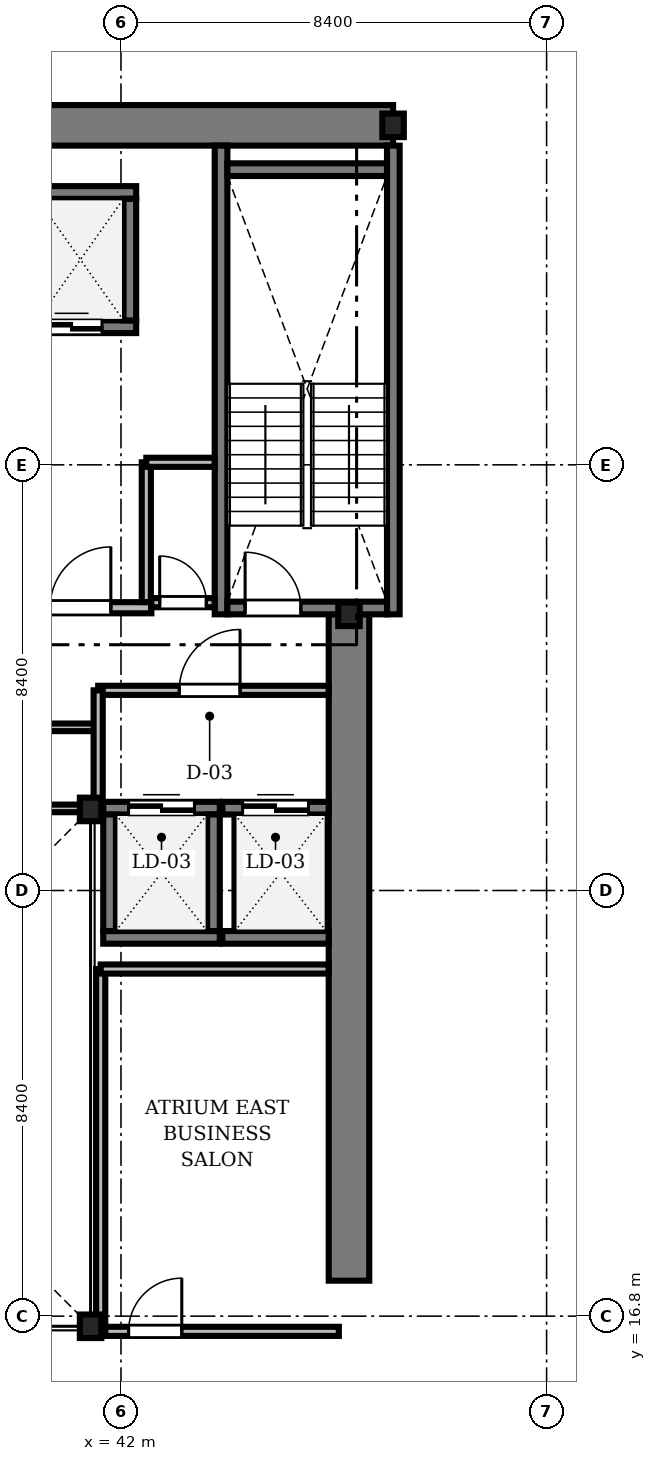
"""IFC4 building model, lengths in metres.
Left out: names, types, materials, properties, quantities, classifications, styles, units other than length and angle.
Written with IfcOpenShell. Run it as: python <this file> out.ifc"""

import sys

from ifc_helpers import new_model, si_unit, direction, frame, frame_2d, origin, origin_2d, place, context, subcontext, project, spatial, rectangle, i_section, extrude, source, transform, mapped, element, fill, save


model = new_model("IFC4")
c1 = context("Model", 3, precision=1e-05, world=origin(), true_north=direction((0.0, 1.0)))
c2 = subcontext(c1, "Body", "Model", "MODEL_VIEW")
j1 = project(units=[si_unit("LENGTHUNIT", "METRE"), si_unit("PLANEANGLEUNIT", "RADIAN")], contexts=[c1])
p1 = place(None, origin())
s1 = spatial("IfcSite", under=j1, at=p1, CompositionType="ELEMENT")
p2 = place(p1, origin())
s2 = spatial("IfcBuilding", under=s1, at=p2, CompositionType="ELEMENT")
p3 = place(p2, frame((0.0, 0.0, 129.8)))
s3 = spatial("IfcBuildingStorey", under=s2, at=p3, CompositionType="ELEMENT", Elevation=129.8)
m1 = source(origin(), c2, "Body", "SweptSolid", [
    extrude(rectangle(XDim=17.52, YDim=0.8, at=frame_2d((8.76, 0.0))), origin(), (0.0, 0.0, 1.0), 3.46),
])
p4 = place(p3, frame((29.85, 40.3, 0.0), z_axis=(0.0, 0.0, 1.0), x_axis=(1.0, 0.0, 0.0)))
e1 = element("IfcWall", 1, at=p4, inside=s3, PredefinedType="SHEAR", context=c2, shape_type="MappedRepresentation", body=[
    mapped(m1, transform((0.0, 0.0, 0.0), scale=1.0)),
])
m2 = source(origin(), c2, "Body", "SweptSolid", [
    extrude(rectangle(XDim=13.15, YDim=0.8, at=frame_2d((6.575, 0.0))), origin(), (0.0, 0.0, 1.0), 3.46),
])
p5 = place(p3, frame((46.5, 17.5, 0.0), z_axis=(0.0, 0.0, 1.0), x_axis=(0.0, 1.0, 0.0)))
e2 = element("IfcWall", 2, at=p5, inside=s3, PredefinedType="SHEAR", context=c2, shape_type="MappedRepresentation", body=[
    mapped(m2, transform((0.0, 0.0, 0.0), scale=1.0)),
])
m3 = source(origin(), c2, "Body", "SweptSolid", [
    extrude(i_section(OverallWidth=0.424, OverallDepth=0.465, WebThickness=0.035, FlangeThickness=0.056, FilletRadius=0.015, at=origin_2d()), origin(), (0.0, 0.0, 1.0), 3.46),
])
for number, where, z_axis, x_axis in (
    (3, (41.4, 16.6, 0.0), (0.0, 0.0, 1.0), (1.0, 0.0, 0.0)),
    (4, (41.4, 26.8, 0.0), (0.0, 0.0, 1.0), (1.0, 0.0, 0.0)),
    (5, (46.5, 30.65, 0.0), (0.0, 0.0, 1.0), (1.0, 0.0, 0.0)),
    (6, (47.37, 40.3, 0.0), (0.0, 0.0, 1.0), (1.0, 0.0, 0.0)),
):
    element("IfcColumn", number, at=place(p3, frame(where, z_axis=z_axis, x_axis=x_axis)), inside=s3, PredefinedType="COLUMN", context=c2, shape_type="MappedRepresentation", body=[
        mapped(m3, transform((0.0, 0.0, 0.0), scale=1.0)),
    ])
m4 = source(origin(), c2, "Body", "SweptSolid", [
    extrude(rectangle(XDim=9.25, YDim=0.25, at=frame_2d((4.625, 0.0))), origin(), (0.0, 0.0, 1.0), 3.5),
])
for number, where, z_axis, x_axis in (
    (7, (43.975, 30.65, 0.0), (0.0, 0.0, 1.0), (0.0, 1.0, 0.0)),
    (8, (47.375, 30.65, 0.0), (0.0, 0.0, 1.0), (0.0, 1.0, 0.0)),
):
    element("IfcWall", number, at=place(p3, frame(where, z_axis=z_axis, x_axis=x_axis)), inside=s3, PredefinedType="SOLIDWALL", context=c2, shape_type="MappedRepresentation", body=[
        mapped(m4, transform((0.0, 0.0, 0.0), scale=1.0)),
    ])
m5 = source(origin(), c2, "Body", "SweptSolid", [
    extrude(rectangle(XDim=3.15, YDim=0.25, at=frame_2d((1.575, 0.0))), origin(), (0.0, 0.0, 1.0), 3.5),
])
p6 = place(p3, frame((44.1, 39.425, 0.0), z_axis=(0.0, 0.0, 1.0), x_axis=(1.0, 0.0, 0.0)))
e9 = element("IfcWall", 9, at=p6, inside=s3, PredefinedType="SOLIDWALL", context=c2, shape_type="MappedRepresentation", body=[
    mapped(m5, transform((0.0, 0.0, 0.0), scale=1.0)),
])
p7 = place(p3, frame((44.1, 30.775, 0.0), z_axis=(0.0, 0.0, 1.0), x_axis=(1.0, 0.0, 0.0)))
e10 = element("IfcWall", 10, at=p7, inside=s3, PredefinedType="SOLIDWALL", context=c2, shape_type="MappedRepresentation", body=[
    mapped(m5, transform((0.0, 0.0, 0.0), scale=1.0)),
])
m6 = source(origin(), c2, "Body", "SweptSolid", [
    extrude(rectangle(XDim=1.1, YDim=2.2, at=frame_2d((0.55, 1.1))), frame((0.0, 0.135, 0.0), z_axis=(0.0, -1.0, 0.0), x_axis=(1.0, 0.0, 0.0)), (0.0, 0.0, 1.0), 0.27),
])
p8 = place(p7, frame((0.35, 0.0, 0.0)))
e11 = element("IfcOpeningElement", 11, at=p8, cuts=e10, PredefinedType="OPENING", context=c2, shape_type="MappedRepresentation", body=[
    mapped(m6, transform((0.0, 0.0, 0.0), scale=1.0)),
])
m7 = source(origin(), c2, "Body", "SweptSolid", [
    extrude(rectangle(XDim=2.8, YDim=0.22, at=frame_2d((1.4, 0.0))), origin(), (0.0, 0.0, 1.0), 3.46),
])
p9 = place(p3, frame((39.8, 30.78, 0.0), z_axis=(0.0, 0.0, 1.0), x_axis=(1.0, 0.0, 0.0)))
e12 = element("IfcWall", 12, at=p9, inside=s3, PredefinedType="SOLIDWALL", context=c2, shape_type="MappedRepresentation", body=[
    mapped(m7, transform((0.0, 0.0, 0.0), scale=1.0)),
])
m8 = source(origin(), c2, "Body", "SweptSolid", [
    extrude(rectangle(XDim=1.2, YDim=2.2, at=frame_2d((0.6, 1.1))), frame((0.0, 0.12, 0.0), z_axis=(0.0, -1.0, 0.0), x_axis=(1.0, 0.0, 0.0)), (0.0, 0.0, 1.0), 0.24),
])
p10 = place(p9, frame((0.8, 0.0, 0.0)))
e13 = element("IfcOpeningElement", 13, at=p10, cuts=e12, PredefinedType="OPENING", context=c2, shape_type="MappedRepresentation", body=[
    mapped(m8, transform((0.0, 0.0, 0.0), scale=1.0)),
])
m9 = source(origin(), c2, "Body", "SweptSolid", [
    extrude(rectangle(XDim=2.55, YDim=0.25, at=frame_2d((1.275, 0.0))), origin(), (0.0, 0.0, 1.0), 3.46),
])
p11 = place(p3, frame((39.75, 36.325, 0.0), z_axis=(0.0, 0.0, 1.0), x_axis=(1.0, 0.0, 0.0)))
e14 = element("IfcWall", 14, at=p11, inside=s3, PredefinedType="SOLIDWALL", context=c2, shape_type="MappedRepresentation", body=[
    mapped(m9, transform((0.0, 0.0, 0.0), scale=1.0)),
])
m10 = source(origin(), c2, "Body", "SweptSolid", [
    extrude(rectangle(XDim=1.2, YDim=2.25, at=frame_2d((0.6, 1.125))), frame((0.0, 0.135, 0.0), z_axis=(0.0, -1.0, 0.0), x_axis=(1.0, 0.0, 0.0)), (0.0, 0.0, 1.0), 0.27),
])
p12 = place(p11, frame((0.675, 0.0, 0.0)))
e15 = element("IfcOpeningElement", 15, at=p12, cuts=e14, PredefinedType="OPENING", context=c2, shape_type="MappedRepresentation", body=[
    mapped(m10, transform((0.0, 0.0, 0.0), scale=1.0)),
])
p13 = place(p3, frame((39.75, 38.975, 0.0), z_axis=(0.0, 0.0, 1.0), x_axis=(1.0, 0.0, 0.0)))
e16 = element("IfcWall", 16, at=p13, inside=s3, PredefinedType="SOLIDWALL", context=c2, shape_type="MappedRepresentation", body=[
    mapped(m9, transform((0.0, 0.0, 0.0), scale=1.0)),
])
m11 = source(origin(), c2, "Body", "SweptSolid", [
    extrude(rectangle(XDim=2.4, YDim=0.25, at=frame_2d((1.2, 0.0))), origin(), (0.0, 0.0, 1.0), 3.46),
])
p14 = place(p3, frame((42.175, 36.45, 0.0), z_axis=(0.0, 0.0, 1.0), x_axis=(0.0, 1.0, 0.0)))
e17 = element("IfcWall", 17, at=p14, inside=s3, PredefinedType="SOLIDWALL", context=c2, shape_type="MappedRepresentation", body=[
    mapped(m11, transform((0.0, 0.0, 0.0), scale=1.0)),
])
m12 = source(origin(), c2, "Body", "SweptSolid", [
    extrude(rectangle(XDim=2.3, YDim=0.25, at=frame_2d((1.15, 0.0))), origin(), (0.0, 0.0, 1.0), 3.46),
])
p15 = place(p3, frame((41.65, 24.275, 0.0), z_axis=(0.0, 0.0, 1.0), x_axis=(1.0, 0.0, 0.0)))
e18 = element("IfcWall", 18, at=p15, inside=s3, PredefinedType="SOLIDWALL", context=c2, shape_type="MappedRepresentation", body=[
    mapped(m12, transform((0.0, 0.0, 0.0), scale=1.0)),
])
p16 = place(p3, frame((41.65, 26.825, 0.0), z_axis=(0.0, 0.0, 1.0), x_axis=(1.0, 0.0, 0.0)))
e19 = element("IfcWall", 19, at=p16, inside=s3, PredefinedType="SOLIDWALL", context=c2, shape_type="MappedRepresentation", body=[
    mapped(m12, transform((0.0, 0.0, 0.0), scale=1.0)),
])
m13 = source(origin(), c2, "Body", "SweptSolid", [
    extrude(rectangle(XDim=1.3, YDim=2.3, at=frame_2d((0.65, 1.15))), frame((0.0, 0.135, 0.0), z_axis=(0.0, -1.0, 0.0), x_axis=(1.0, 0.0, 0.0)), (0.0, 0.0, 1.0), 0.27),
])
p17 = place(p16, frame((0.5, 0.0, 0.0)))
e20 = element("IfcOpeningElement", 20, at=p17, cuts=e19, PredefinedType="OPENING", context=c2, shape_type="MappedRepresentation", body=[
    mapped(m13, transform((0.0, 0.0, 0.0), scale=1.0)),
])
for number, where, z_axis, x_axis in (
    (21, (41.775, 24.4, 0.0), (0.0, 0.0, 1.0), (0.0, 1.0, 0.0)),
    (22, (43.825, 24.4, 0.0), (0.0, 0.0, 1.0), (0.0, 1.0, 0.0)),
):
    element("IfcWall", number, at=place(p3, frame(where, z_axis=z_axis, x_axis=x_axis)), inside=s3, PredefinedType="SOLIDWALL", context=c2, shape_type="MappedRepresentation", body=[
        mapped(m12, transform((0.0, 0.0, 0.0), scale=1.0)),
    ])
m14 = source(origin(), c2, "Body", "SweptSolid", [
    extrude(rectangle(XDim=2.1, YDim=0.25, at=frame_2d((1.05, 0.0))), origin(), (0.0, 0.0, 1.0), 3.46),
])
p18 = place(p3, frame((44.0, 24.275, 0.0), z_axis=(0.0, 0.0, 1.0), x_axis=(1.0, 0.0, 0.0)))
e23 = element("IfcWall", 23, at=p18, inside=s3, PredefinedType="SOLIDWALL", context=c2, shape_type="MappedRepresentation", body=[
    mapped(m14, transform((0.0, 0.0, 0.0), scale=1.0)),
])
p19 = place(p3, frame((44.0, 26.825, 0.0), z_axis=(0.0, 0.0, 1.0), x_axis=(1.0, 0.0, 0.0)))
e24 = element("IfcWall", 24, at=p19, inside=s3, PredefinedType="SOLIDWALL", context=c2, shape_type="MappedRepresentation", body=[
    mapped(m14, transform((0.0, 0.0, 0.0), scale=1.0)),
])
p20 = place(p19, frame((0.4, 0.0, 0.0)))
e25 = element("IfcOpeningElement", 25, at=p20, cuts=e24, PredefinedType="OPENING", context=c2, shape_type="MappedRepresentation", body=[
    mapped(m13, transform((0.0, 0.0, 0.0), scale=1.0)),
])
m15 = source(origin(), c2, "Body", "SweptSolid", [
    extrude(rectangle(XDim=4.548, YDim=0.18, at=frame_2d((2.274, 0.0))), origin(), (0.0, 0.0, 1.0), 3.092),
])
p21 = place(p3, frame((41.55, 29.15, 0.0), z_axis=(0.0, 0.0, 1.0), x_axis=(1.0, 0.0, 0.0)))
e26 = element("IfcWall", 26, at=p21, inside=s3, PredefinedType="PARTITIONING", context=c2, shape_type="MappedRepresentation", body=[
    mapped(m15, transform((0.0, 0.0, 0.0), scale=1.0)),
])
m16 = source(origin(), c2, "Body", "SweptSolid", [
    extrude(rectangle(XDim=1.2, YDim=2.2, at=frame_2d((0.6, 1.1))), frame((0.0, 0.1, 0.0), z_axis=(0.0, -1.0, 0.0), x_axis=(1.0, 0.0, 0.0)), (0.0, 0.0, 1.0), 0.2),
])
p22 = place(p21, frame((1.6, 0.0, 0.0)))
e27 = element("IfcOpeningElement", 27, at=p22, cuts=e26, PredefinedType="OPENING", context=c2, shape_type="MappedRepresentation", body=[
    mapped(m16, transform((0.0, 0.0, 0.0), scale=1.0)),
])
m17 = source(origin(), c2, "Body", "SweptSolid", [
    extrude(rectangle(XDim=4.7, YDim=0.18, at=frame_2d((2.35, 0.0))), origin(), (0.0, 0.0, 1.0), 2.852),
])
p23 = place(p3, frame((41.6, 16.5, 0.0), z_axis=(0.0, 0.0, 1.0), x_axis=(1.0, 0.0, 0.0)))
e28 = element("IfcWall", 28, at=p23, inside=s3, PredefinedType="PARTITIONING", context=c2, shape_type="MappedRepresentation", body=[
    mapped(m17, transform((0.0, 0.0, 0.0), scale=1.0)),
])
m18 = source(origin(), c2, "Body", "SweptSolid", [
    extrude(rectangle(XDim=1.05, YDim=2.2, at=frame_2d((0.525, 1.1))), frame((0.0, 0.1, 0.0), z_axis=(0.0, -1.0, 0.0), x_axis=(1.0, 0.0, 0.0)), (0.0, 0.0, 1.0), 0.2),
])
p24 = place(p23, frame((0.55, 0.0, 0.0)))
e29 = element("IfcOpeningElement", 29, at=p24, cuts=e28, PredefinedType="OPENING", context=c2, shape_type="MappedRepresentation", body=[
    mapped(m18, transform((0.0, 0.0, 0.0), scale=1.0)),
])
m19 = source(origin(), c2, "Body", "SweptSolid", [
    extrude(rectangle(XDim=2.74, YDim=0.15, at=frame_2d((1.37, 0.0))), origin(), (0.0, 0.0, 1.0), 3.46),
])
p25 = place(p3, frame((38.78, 28.42, 0.0), z_axis=(0.0, 0.0, 1.0), x_axis=(1.0, 0.0, 0.0)))
e30 = element("IfcWall", 30, at=p25, inside=s3, PredefinedType="PARTITIONING", context=c2, shape_type="MappedRepresentation", body=[
    mapped(m19, transform((0.0, 0.0, 0.0), scale=1.0)),
])
m20 = source(origin(), c2, "Body", "SweptSolid", [
    extrude(rectangle(XDim=0.92, YDim=2.1, at=frame_2d((0.46, 1.05))), frame((0.0, 0.085, 0.0), z_axis=(0.0, -1.0, 0.0), x_axis=(1.0, 0.0, 0.0)), (0.0, 0.0, 1.0), 0.17),
])
p26 = place(p25, frame((0.63, 0.0, 0.0)))
e31 = element("IfcOpeningElement", 31, at=p26, cuts=e30, PredefinedType="OPENING", context=c2, shape_type="MappedRepresentation", body=[
    mapped(m20, transform((0.0, 0.0, 0.0), scale=1.0)),
])
m21 = source(origin(), c2, "Body", "SweptSolid", [
    extrude(rectangle(XDim=1.248, YDim=0.18, at=frame_2d((0.624, 0.0))), origin(), (0.0, 0.0, 1.0), 3.46),
])
p27 = place(p3, frame((42.6, 30.88, 0.0), z_axis=(0.0, 0.0, 1.0), x_axis=(1.0, 0.0, 0.0)))
e32 = element("IfcWall", 32, at=p27, inside=s3, PredefinedType="PARTITIONING", context=c2, shape_type="MappedRepresentation", body=[
    mapped(m21, transform((0.0, 0.0, 0.0), scale=1.0)),
])
m22 = source(origin(), c2, "Body", "SweptSolid", [
    extrude(rectangle(XDim=0.92, YDim=2.1, at=frame_2d((0.46, 1.05))), frame((0.0, 0.1, 0.0), z_axis=(0.0, -1.0, 0.0), x_axis=(1.0, 0.0, 0.0)), (0.0, 0.0, 1.0), 0.2),
])
p28 = place(p27, frame((0.164, 0.0, 0.0)))
e33 = element("IfcOpeningElement", 33, at=p28, cuts=e32, PredefinedType="OPENING", context=c2, shape_type="MappedRepresentation", body=[
    mapped(m22, transform((0.0, 0.0, 0.0), scale=1.0)),
])
m23 = source(origin(), c2, "Body", "SweptSolid", [
    extrude(rectangle(XDim=7.15, YDim=0.18, at=frame_2d((3.575, 0.0))), origin(), (0.0, 0.0, 1.0), 2.852),
])
p29 = place(p3, frame((41.6, 16.5, 0.0), z_axis=(0.0, 0.0, 1.0), x_axis=(0.0, 1.0, 0.0)))
e34 = element("IfcWall", 34, at=p29, inside=s3, PredefinedType="PARTITIONING", context=c2, shape_type="MappedRepresentation", body=[
    mapped(m23, transform((0.0, 0.0, 0.0), scale=1.0)),
])
m24 = source(origin(), c2, "Body", "SweptSolid", [
    extrude(rectangle(XDim=4.498, YDim=0.18, at=frame_2d((2.249, 0.0))), origin(), (0.0, 0.0, 1.0), 3.46),
])
p30 = place(p3, frame((41.6, 23.65, 0.0), z_axis=(0.0, 0.0, 1.0), x_axis=(1.0, 0.0, 0.0)))
e35 = element("IfcWall", 35, at=p30, inside=s3, PredefinedType="PARTITIONING", context=c2, shape_type="MappedRepresentation", body=[
    mapped(m24, transform((0.0, 0.0, 0.0), scale=1.0)),
])
m25 = source(origin(), c2, "Body", "SweptSolid", [
    extrude(rectangle(XDim=2.758, YDim=0.18, at=frame_2d((1.379, 0.0))), origin(), (0.0, 0.0, 1.0), 3.46),
])
p31 = place(p3, frame((42.5, 30.892, 0.0), z_axis=(0.0, 0.0, 1.0), x_axis=(0.0, 1.0, 0.0)))
e36 = element("IfcWall", 36, at=p31, inside=s3, PredefinedType="PARTITIONING", context=c2, shape_type="MappedRepresentation", body=[
    mapped(m25, transform((0.0, 0.0, 0.0), scale=1.0)),
])
m26 = source(origin(), c2, "Body", "SweptSolid", [
    extrude(rectangle(XDim=2.74, YDim=0.15, at=frame_2d((1.37, 0.0))), origin(), (0.0, 0.0, 1.0), 2.852),
])
p32 = place(p3, frame((38.78, 26.82, 0.0), z_axis=(0.0, 0.0, 1.0), x_axis=(1.0, 0.0, 0.0)))
e37 = element("IfcWall", 37, at=p32, inside=s3, PredefinedType="PARTITIONING", context=c2, shape_type="MappedRepresentation", body=[
    mapped(m26, transform((0.0, 0.0, 0.0), scale=1.0)),
])
m27 = source(origin(), c2, "Body", "SweptSolid", [
    extrude(rectangle(XDim=2.35, YDim=0.18, at=frame_2d((1.175, 0.0))), origin(), (0.0, 0.0, 1.0), 2.852),
])
p33 = place(p3, frame((41.55, 26.8, 0.0), z_axis=(0.0, 0.0, 1.0), x_axis=(0.0, 1.0, 0.0)))
e38 = element("IfcWall", 38, at=p33, inside=s3, PredefinedType="PARTITIONING", context=c2, shape_type="MappedRepresentation", body=[
    mapped(m27, transform((0.0, 0.0, 0.0), scale=1.0)),
])
m28 = source(origin(), c2, "Body", "SweptSolid", [
    extrude(rectangle(XDim=1.348, YDim=0.18, at=frame_2d((0.674, 0.0))), origin(), (0.0, 0.0, 1.0), 3.46),
])
p34 = place(p3, frame((42.5, 33.65, 0.0), z_axis=(0.0, 0.0, 1.0), x_axis=(1.0, 0.0, 0.0)))
e39 = element("IfcWall", 39, at=p34, inside=s3, PredefinedType="PARTITIONING", context=c2, shape_type="MappedRepresentation", body=[
    mapped(m28, transform((0.0, 0.0, 0.0), scale=1.0)),
])
m29 = source(origin(), c2, "Body", "SweptSolid", [
    extrude(rectangle(XDim=1.1, YDim=2.2, at=frame_2d((0.55, 1.1))), frame((0.0, 0.025, 0.0), z_axis=(0.0, -1.0, 0.0), x_axis=(1.0, 0.0, 0.0)), (0.0, 0.0, 1.0), 0.05),
])
p35 = place(p8, origin())
e40 = element("IfcDoor", 40, at=p35, inside=s3, OperationType="SINGLE_SWING_LEFT", PredefinedType="DOOR", context=c2, shape_type="MappedRepresentation", body=[
    mapped(m29, transform((0.0, 0.0, 0.0), scale=1.0)),
])
fill(e11, e40)
m30 = source(origin(), c2, "Body", "SweptSolid", [
    extrude(rectangle(XDim=1.2, YDim=2.2, at=frame_2d((0.6, 1.1))), frame((0.0, 0.025, 0.0), z_axis=(0.0, -1.0, 0.0), x_axis=(1.0, 0.0, 0.0)), (0.0, 0.0, 1.0), 0.05),
])
p36 = place(p10, origin())
e41 = element("IfcDoor", 41, at=p36, inside=s3, OperationType="SINGLE_SWING_RIGHT", PredefinedType="DOOR", context=c2, shape_type="MappedRepresentation", body=[
    mapped(m30, transform((0.0, 0.0, 0.0), scale=1.0)),
])
fill(e13, e41)
m31 = source(origin(), c2, "Body", "SweptSolid", [
    extrude(rectangle(XDim=1.2, YDim=2.25, at=frame_2d((0.6, 1.125))), frame((0.0, 0.025, 0.0), z_axis=(0.0, -1.0, 0.0), x_axis=(1.0, 0.0, 0.0)), (0.0, 0.0, 1.0), 0.05),
])
p37 = place(p12, origin())
e42 = element("IfcDoor", 42, at=p37, inside=s3, OperationType="DOUBLE_DOOR_SLIDING", PredefinedType="DOOR", context=c2, shape_type="MappedRepresentation", body=[
    mapped(m31, transform((0.0, 0.0, 0.0), scale=1.0)),
])
fill(e15, e42)
m32 = source(origin(), c2, "Body", "SweptSolid", [
    extrude(rectangle(XDim=1.3, YDim=2.3, at=frame_2d((0.65, 1.15))), frame((0.0, 0.025, 0.0), z_axis=(0.0, -1.0, 0.0), x_axis=(1.0, 0.0, 0.0)), (0.0, 0.0, 1.0), 0.05),
])
p38 = place(p17, origin())
e43 = element("IfcDoor", 43, at=p38, inside=s3, OperationType="DOUBLE_DOOR_SLIDING", PredefinedType="DOOR", context=c2, shape_type="MappedRepresentation", body=[
    mapped(m32, transform((0.0, 0.0, 0.0), scale=1.0)),
])
fill(e20, e43)
p39 = place(p20, origin())
e44 = element("IfcDoor", 44, at=p39, inside=s3, OperationType="DOUBLE_DOOR_SLIDING", PredefinedType="DOOR", context=c2, shape_type="MappedRepresentation", body=[
    mapped(m32, transform((0.0, 0.0, 0.0), scale=1.0)),
])
fill(e25, e44)
p40 = place(p22, origin())
e45 = element("IfcDoor", 45, at=p40, inside=s3, OperationType="SINGLE_SWING_RIGHT", PredefinedType="DOOR", context=c2, shape_type="MappedRepresentation", body=[
    mapped(m30, transform((0.0, 0.0, 0.0), scale=1.0)),
])
fill(e27, e45)
m33 = source(origin(), c2, "Body", "SweptSolid", [
    extrude(rectangle(XDim=1.05, YDim=2.2, at=frame_2d((0.525, 1.1))), frame((0.0, 0.025, 0.0), z_axis=(0.0, -1.0, 0.0), x_axis=(1.0, 0.0, 0.0)), (0.0, 0.0, 1.0), 0.05),
])
p41 = place(p24, origin())
e46 = element("IfcDoor", 46, at=p41, inside=s3, OperationType="SINGLE_SWING_RIGHT", PredefinedType="DOOR", context=c2, shape_type="MappedRepresentation", body=[
    mapped(m33, transform((0.0, 0.0, 0.0), scale=1.0)),
])
fill(e29, e46)
m34 = source(origin(), c2, "Body", "SweptSolid", [
    extrude(rectangle(XDim=0.92, YDim=2.1, at=frame_2d((0.46, 1.05))), frame((0.0, 0.025, 0.0), z_axis=(0.0, -1.0, 0.0), x_axis=(1.0, 0.0, 0.0)), (0.0, 0.0, 1.0), 0.05),
])
p42 = place(p28, origin())
e47 = element("IfcDoor", 47, at=p42, inside=s3, OperationType="SINGLE_SWING_LEFT", PredefinedType="DOOR", context=c2, shape_type="MappedRepresentation", body=[
    mapped(m34, transform((0.0, 0.0, 0.0), scale=1.0)),
])
fill(e33, e47)
save(model, sys.argv[1])
